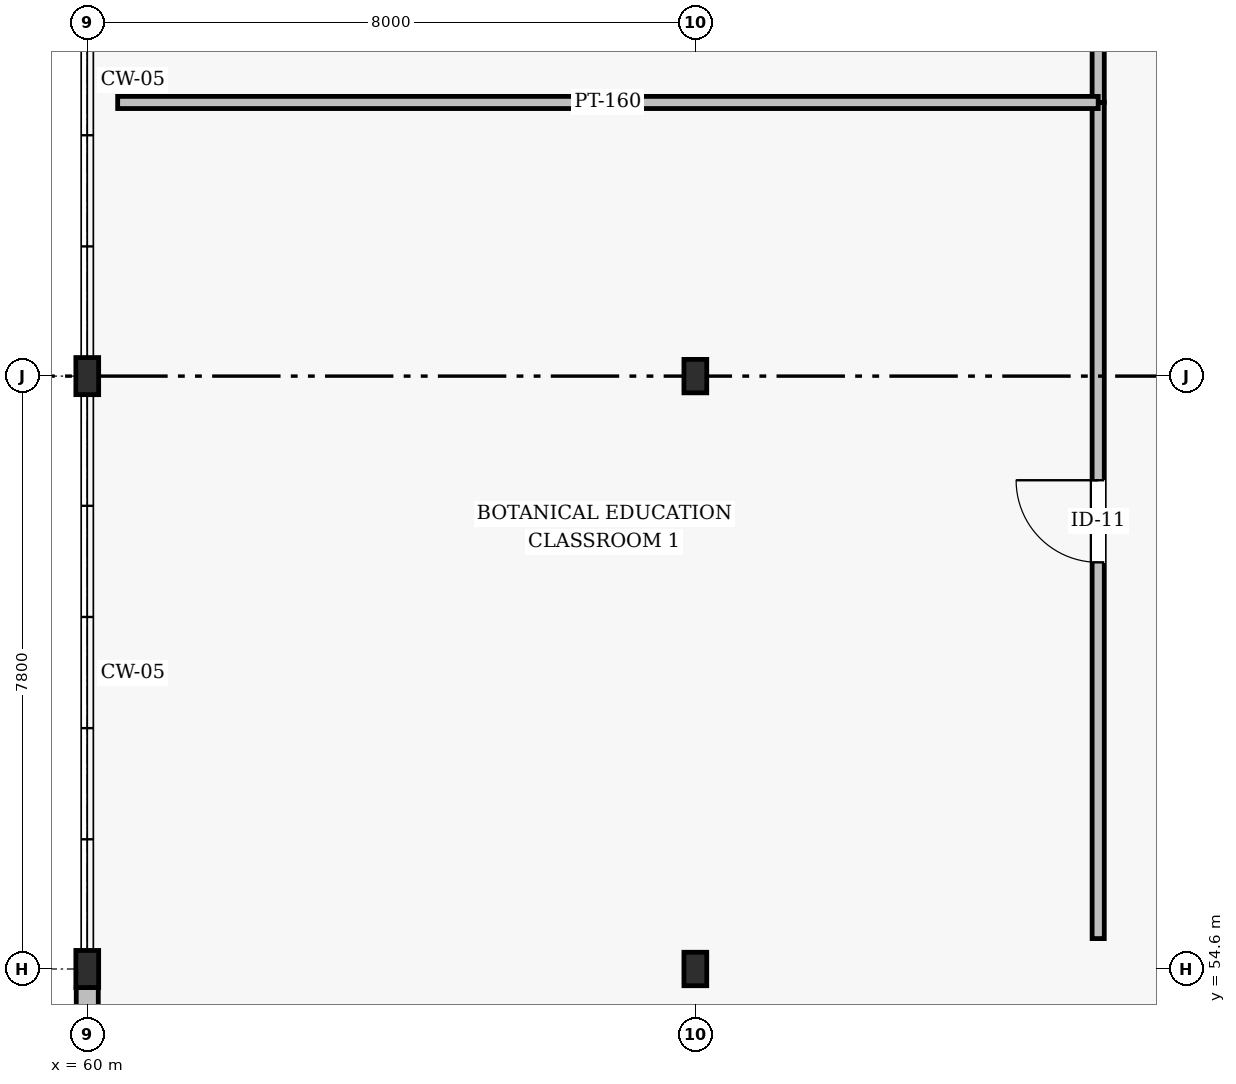
"""IFC4 building model, lengths in metres.
Left out: names, types, materials, properties, quantities, classifications, styles, units other than length and angle.
Written with IfcOpenShell. Run it as: python <this file> out.ifc"""

import sys

from ifc_helpers import new_model, si_unit, direction, frame, frame_2d, origin, origin_2d, place, context, subcontext, project, spatial, rectangle, i_section, extrude, element, fill, save


model = new_model("IFC4")
c1 = context("Model", 3, precision=1e-05, world=origin(), true_north=direction((0.0, 1.0)))
c2 = subcontext(c1, "Body", "Model", "MODEL_VIEW")
j1 = project(units=[si_unit("LENGTHUNIT", "METRE"), si_unit("PLANEANGLEUNIT", "RADIAN")], contexts=[c1])
p1 = place(None, origin())
s1 = spatial("IfcSite", under=j1, at=p1, CompositionType="ELEMENT")
p2 = place(p1, origin())
s2 = spatial("IfcBuilding", under=s1, at=p2, CompositionType="ELEMENT")
p3 = place(p2, frame((0.0, 0.0, 4.8)))
s3 = spatial("IfcBuildingStorey", under=s2, at=p3, CompositionType="ELEMENT", Elevation=4.8)
for number, where, z_axis, x_axis in (
    (1, (60.0, 54.6, 0.0), (0.0, 0.0, 1.0), (1.0, 0.0, 0.0)),
    (2, (60.0, 62.4, 0.0), (0.0, 0.0, 1.0), (1.0, 0.0, 0.0)),
):
    element("IfcColumn", number, at=place(p3, frame(where, z_axis=z_axis, x_axis=x_axis)), inside=s3, PredefinedType="COLUMN", context=c2, shape_type="SweptSolid", body=[
        extrude(i_section(OverallWidth=0.3, OverallDepth=0.488, WebThickness=0.011, FlangeThickness=0.018, FilletRadius=0.024, at=origin_2d()), origin(), (0.0, 0.0, 1.0), 4.2),
    ])
for number, where, z_axis, x_axis in (
    (3, (68.0, 54.6, 0.0), (0.0, 0.0, 1.0), (1.0, 0.0, 0.0)),
    (4, (68.0, 62.4, 0.0), (0.0, 0.0, 1.0), (1.0, 0.0, 0.0)),
):
    element("IfcColumn", number, at=place(p3, frame(where, z_axis=z_axis, x_axis=x_axis)), inside=s3, PredefinedType="COLUMN", context=c2, shape_type="SweptSolid", body=[
        extrude(i_section(OverallWidth=0.3, OverallDepth=0.44, WebThickness=0.011, FlangeThickness=0.018, FilletRadius=0.024, at=origin_2d()), origin(), (0.0, 0.0, 1.0), 4.2),
    ])
p4 = place(p3, frame((60.0, 54.356, 0.0), z_axis=(0.0, 0.0, 1.0), x_axis=(0.0, -1.0, 0.0)))
e5 = element("IfcWall", 5, at=p4, inside=s3, PredefinedType="SOLIDWALL", context=c2, shape_type="SweptSolid", body=[
    extrude(rectangle(XDim=7.336, YDim=0.29, at=frame_2d((3.668, 0.0))), origin(), (0.0, 0.0, 1.0), 3.461),
])
p5 = place(p4, frame((1.345, 0.0, 0.75)))
e6 = element("IfcOpeningElement", 6, at=p5, cuts=e5, PredefinedType="OPENING", context=c2, shape_type="SweptSolid", body=[
    extrude(rectangle(XDim=2.2, YDim=2.4, at=frame_2d((1.1, 1.2))), frame((0.0, 0.155, 0.0), z_axis=(0.0, -1.0, 0.0), x_axis=(1.0, 0.0, 0.0)), (0.0, 0.0, 1.0), 0.31),
])
p6 = place(p3, frame((73.3, 55.0, 0.0), z_axis=(0.0, 0.0, 1.0), x_axis=(0.0, 1.0, 0.0)))
e7 = element("IfcWall", 7, at=p6, inside=s3, PredefinedType="PARTITIONING", context=c2, shape_type="SweptSolid", body=[
    extrude(rectangle(XDim=11.0, YDim=0.16, at=frame_2d((5.5, 0.0))), origin(), (0.0, 0.0, 1.0), 3.459),
])
p7 = place(p6, frame((4.95, 0.0, 0.0)))
e8 = element("IfcOpeningElement", 8, at=p7, cuts=e7, PredefinedType="OPENING", context=c2, shape_type="SweptSolid", body=[
    extrude(rectangle(XDim=1.08, YDim=2.08, at=frame_2d((0.54, 1.04))), frame((0.0, 0.09, 0.0), z_axis=(0.0, -1.0, 0.0), x_axis=(1.0, 0.0, 0.0)), (0.0, 0.0, 1.0), 0.18),
])
p8 = place(p3, frame((73.3, 66.0, 0.0), z_axis=(0.0, 0.0, 1.0), x_axis=(0.0, 1.0, 0.0)))
e9 = element("IfcWall", 9, at=p8, inside=s3, PredefinedType="PARTITIONING", context=c2, shape_type="SweptSolid", body=[
    extrude(rectangle(XDim=11.6, YDim=0.16, at=frame_2d((5.8, 0.0))), origin(), (0.0, 0.0, 1.0), 3.459),
])
p9 = place(p8, frame((5.25, 0.0, 0.0)))
e10 = element("IfcOpeningElement", 10, at=p9, cuts=e9, PredefinedType="OPENING", context=c2, shape_type="SweptSolid", body=[
    extrude(rectangle(XDim=1.08, YDim=2.08, at=frame_2d((0.54, 1.04))), frame((0.0, 0.09, 0.0), z_axis=(0.0, -1.0, 0.0), x_axis=(1.0, 0.0, 0.0)), (0.0, 0.0, 1.0), 0.18),
])
p10 = place(p3, frame((60.4, 66.0, 0.0), z_axis=(0.0, 0.0, 1.0), x_axis=(1.0, 0.0, 0.0)))
e11 = element("IfcWall", 11, at=p10, inside=s3, PredefinedType="PARTITIONING", context=c2, shape_type="SweptSolid", body=[
    extrude(rectangle(XDim=12.9, YDim=0.16, at=frame_2d((6.45, 0.0))), origin(), (0.0, 0.0, 1.0), 3.605),
])
p11 = place(p7, origin())
e12 = element("IfcDoor", 12, at=p11, inside=s3, OperationType="SINGLE_SWING_RIGHT", PredefinedType="DOOR", context=c2, shape_type="SweptSolid", body=[
    extrude(rectangle(XDim=1.08, YDim=2.08, at=frame_2d((0.54, 1.04))), frame((0.0, 0.025, 0.0), z_axis=(0.0, -1.0, 0.0), x_axis=(1.0, 0.0, 0.0)), (0.0, 0.0, 1.0), 0.05),
])
fill(e8, e12)
save(model, sys.argv[1])
